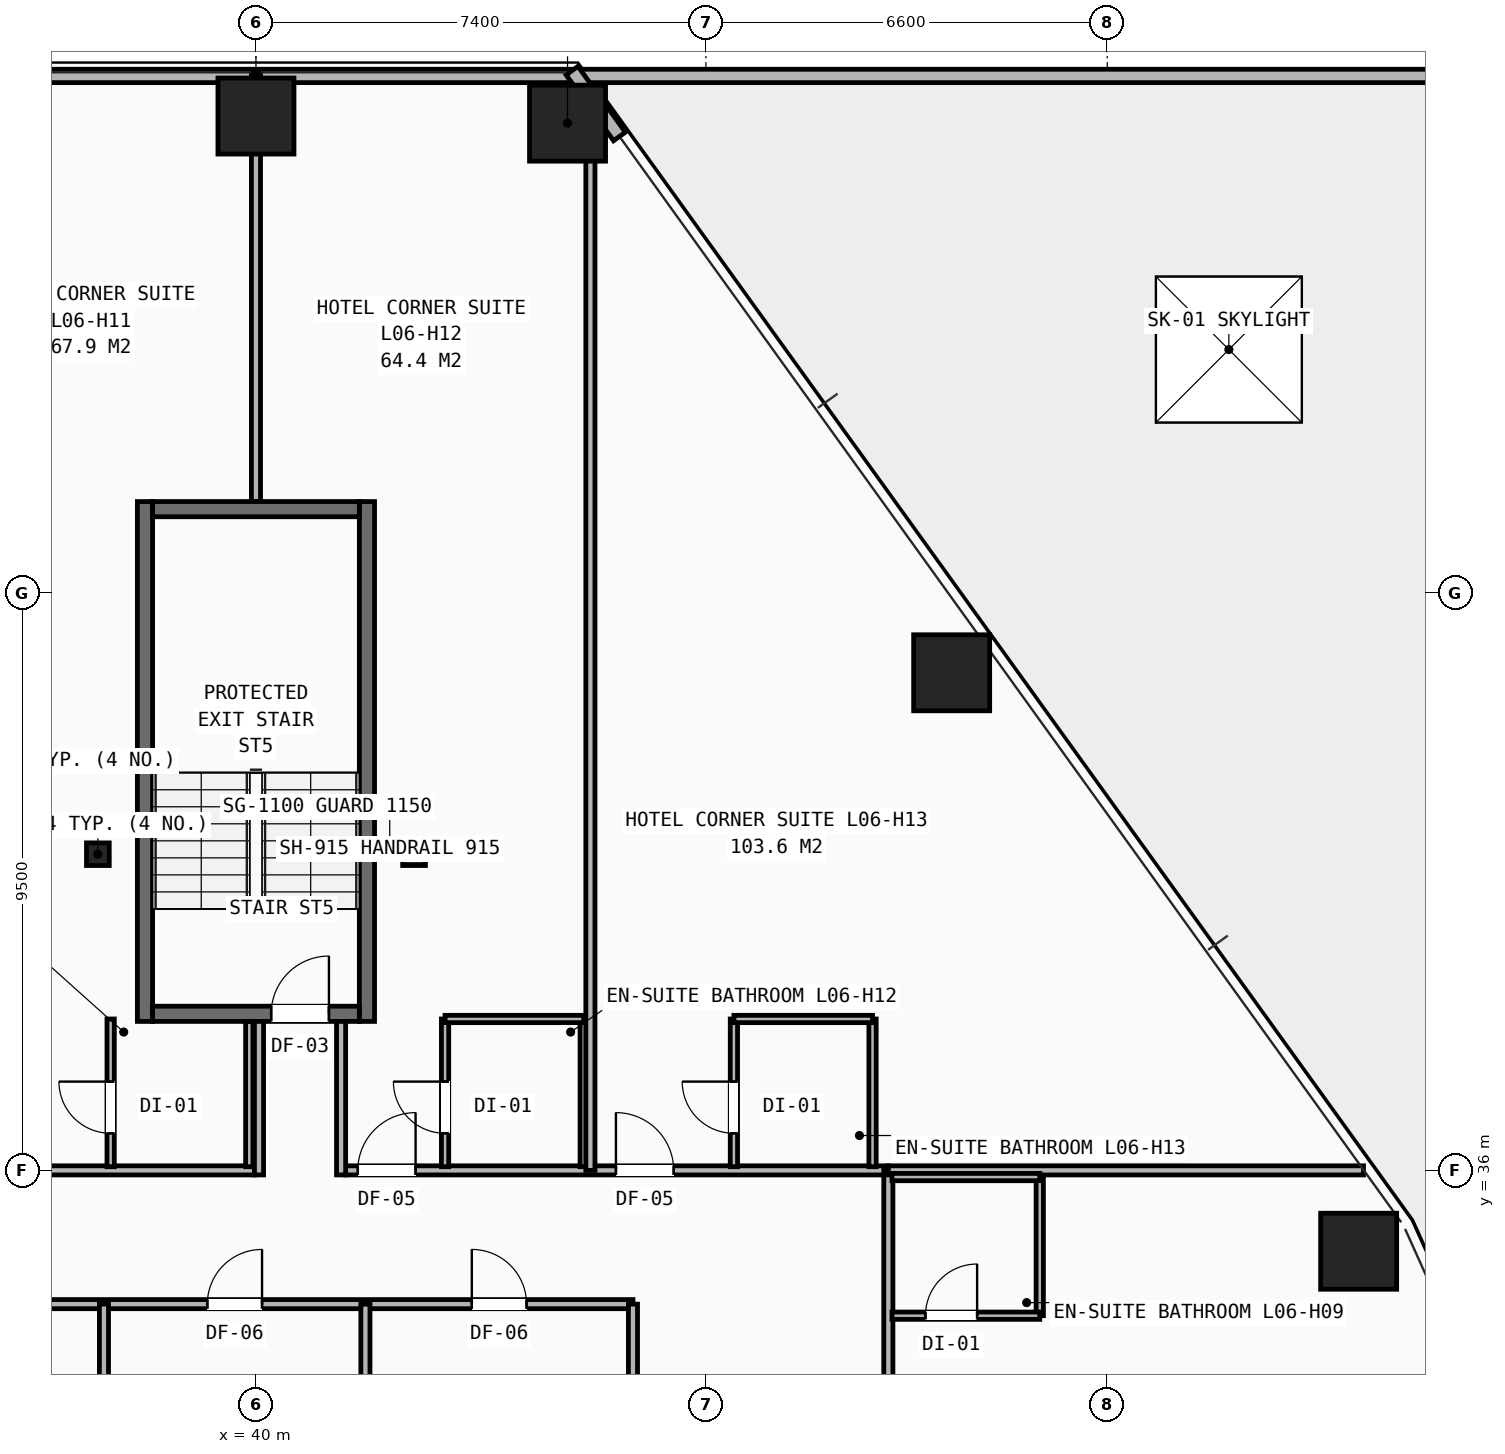
"""IFC4 building model, lengths in metres.
Left out: names, types, materials, properties, quantities, classifications, styles, units other than length and angle.
Written with IfcOpenShell. Run it as: python <this file> out.ifc"""

import sys

from ifc_helpers import new_model, si_unit, direction, frame, frame_2d, origin, origin_2d, place, context, subcontext, project, spatial, rectangle, hollow_rectangle, i_section, extrude, element, fill, save


model = new_model("IFC4")
c1 = context("Model", 3, precision=1e-05, world=origin(), true_north=direction((0.0, 1.0)))
c2 = subcontext(c1, "Body", "Model", "MODEL_VIEW")
j1 = project(units=[si_unit("LENGTHUNIT", "METRE"), si_unit("PLANEANGLEUNIT", "RADIAN")], contexts=[c1])
p1 = place(None, origin())
s1 = spatial("IfcSite", under=j1, at=p1, CompositionType="ELEMENT")
p2 = place(p1, origin())
s2 = spatial("IfcBuilding", under=s1, at=p2, CompositionType="ELEMENT")
p3 = place(p2, frame((0.0, 0.0, 27.2)))
s3 = spatial("IfcBuildingStorey", under=s2, at=p3, CompositionType="ELEMENT", Elevation=27.2)
for number, where, z_axis, x_axis in (
    (1, (37.4, 41.2, 0.0), (0.0, 0.0, 1.0), (1.0, 0.0, 0.0)),
    (2, (42.6, 41.2, 0.0), (0.0, 0.0, 1.0), (1.0, 0.0, 0.0)),
):
    element("IfcColumn", number, at=place(p3, frame(where, z_axis=z_axis, x_axis=x_axis)), inside=s3, PredefinedType="COLUMN", context=c2, shape_type="SweptSolid", body=[
        extrude(i_section(OverallWidth=0.374, OverallDepth=0.372, WebThickness=0.016, FlangeThickness=0.026, at=origin_2d()), origin(), (0.0, 0.0, 1.0), 3.2),
    ])
for number, where, z_axis, x_axis in (
    (3, (45.124, 53.223, 0.0), (0.0, 0.0, 1.0), (1.0, 0.0, 0.0)),
    (4, (40.0, 53.34, 0.0), (0.0, 0.0, 1.0), (1.0, 0.0, 0.0)),
    (5, (58.135, 34.67, 0.0), (0.0, 0.0, 1.0), (1.0, 0.0, 0.0)),
    (6, (51.441, 44.184, 0.0), (0.0, 0.0, 1.0), (1.0, 0.0, 0.0)),
):
    element("IfcColumn", number, at=place(p3, frame(where, z_axis=z_axis, x_axis=x_axis)), inside=s3, PredefinedType="COLUMN", context=c2, shape_type="SweptSolid", body=[
        extrude(hollow_rectangle(XDim=1.25, YDim=1.25, WallThickness=0.08, at=origin_2d()), origin(), (0.0, 0.0, 1.0), 3.2),
    ])
p4 = place(p3, frame((74.5, 54.0, 0.0), z_axis=(0.0, 0.0, 1.0), x_axis=(-1.0, 0.0, 0.0)))
e7 = element("IfcWall", 7, at=p4, inside=s3, PredefinedType="PARAPET", context=c2, shape_type="SweptSolid", body=[
    extrude(rectangle(XDim=69.0, YDim=0.22, at=frame_2d((34.5, 0.0))), origin(), (0.0, 0.0, 1.0), 1.15),
])
p5 = place(p3, frame((45.978, 53.005, 0.0), z_axis=(0.0, 0.0, 1.0), x_axis=(-0.584193864266, 0.811614150292, 0.0)))
e8 = element("IfcWall", 8, at=p5, inside=s3, PredefinedType="SHEAR", context=c2, shape_type="SweptSolid", body=[
    extrude(rectangle(XDim=1.334, YDim=0.24, at=frame_2d((0.667, 0.0))), origin(), (0.0, 0.0, 1.0), 2.263),
])
p6 = place(p3, frame((33.2, 33.8, 0.0), z_axis=(0.0, 0.0, 1.0), x_axis=(1.0, 0.0, 0.0)))
e9 = element("IfcWall", 9, at=p6, inside=s3, PredefinedType="PARTITIONING", context=c2, shape_type="SweptSolid", body=[
    extrude(rectangle(XDim=13.0, YDim=0.15, at=frame_2d((6.5, 0.0))), origin(), (0.0, 0.0, 1.0), 2.98),
])
p7 = place(p6, frame((1.7, 0.0, 0.0)))
e10 = element("IfcOpeningElement", 10, at=p7, cuts=e9, PredefinedType="OPENING", context=c2, shape_type="SweptSolid", body=[
    extrude(rectangle(XDim=0.9, YDim=2.1, at=frame_2d((0.45, 1.05))), frame((0.0, 0.085, 0.0), z_axis=(0.0, -1.0, 0.0), x_axis=(1.0, 0.0, 0.0)), (0.0, 0.0, 1.0), 0.17),
])
p8 = place(p6, frame((6.0, 0.0, 0.0)))
e11 = element("IfcOpeningElement", 11, at=p8, cuts=e9, PredefinedType="OPENING", context=c2, shape_type="SweptSolid", body=[
    extrude(rectangle(XDim=0.9, YDim=2.1, at=frame_2d((0.45, 1.05))), frame((0.0, 0.085, 0.0), z_axis=(0.0, -1.0, 0.0), x_axis=(1.0, 0.0, 0.0)), (0.0, 0.0, 1.0), 0.17),
])
p9 = place(p6, frame((10.35, 0.0, 0.0)))
e12 = element("IfcOpeningElement", 12, at=p9, cuts=e9, PredefinedType="OPENING", context=c2, shape_type="SweptSolid", body=[
    extrude(rectangle(XDim=0.9, YDim=2.1, at=frame_2d((0.45, 1.05))), frame((0.0, 0.085, 0.0), z_axis=(0.0, -1.0, 0.0), x_axis=(1.0, 0.0, 0.0)), (0.0, 0.0, 1.0), 0.17),
])
for number, where, z_axis, x_axis in (
    (13, (46.2, 31.2, 0.0), (0.0, 0.0, 1.0), (0.0, 1.0, 0.0)),
    (14, (37.5, 31.2, 0.0), (0.0, 0.0, 1.0), (0.0, 1.0, 0.0)),
    (15, (41.8, 31.2, 0.0), (0.0, 0.0, 1.0), (0.0, 1.0, 0.0)),
):
    element("IfcWall", number, at=place(p3, frame(where, z_axis=z_axis, x_axis=x_axis)), inside=s3, PredefinedType="PARTITIONING", context=c2, shape_type="SweptSolid", body=[
        extrude(rectangle(XDim=2.6, YDim=0.15, at=frame_2d((1.3, 0.0))), origin(), (0.0, 0.0, 1.0), 2.431),
    ])
p10 = place(p3, frame((29.6, 36.0, 0.0), z_axis=(0.0, 0.0, 1.0), x_axis=(1.0, 0.0, 0.0)))
e16 = element("IfcWall", 16, at=p10, inside=s3, PredefinedType="PARTITIONING", context=c2, shape_type="SweptSolid", body=[
    extrude(rectangle(XDim=10.375, YDim=0.15, at=frame_2d((5.188, 0.0))), origin(), (0.0, 0.0, 1.0), 2.98),
])
p11 = place(p10, frame((0.57, 0.0, 0.0)))
e17 = element("IfcOpeningElement", 17, at=p11, cuts=e16, PredefinedType="OPENING", context=c2, shape_type="SweptSolid", body=[
    extrude(rectangle(XDim=0.95, YDim=2.1, at=frame_2d((0.475, 1.05))), frame((0.0, 0.085, 0.0), z_axis=(0.0, -1.0, 0.0), x_axis=(1.0, 0.0, 0.0)), (0.0, 0.0, 1.0), 0.17),
])
p12 = place(p10, frame((5.32, 0.0, 0.0)))
e18 = element("IfcOpeningElement", 18, at=p12, cuts=e16, PredefinedType="OPENING", context=c2, shape_type="SweptSolid", body=[
    extrude(rectangle(XDim=0.95, YDim=2.1, at=frame_2d((0.475, 1.05))), frame((0.0, 0.085, 0.0), z_axis=(0.0, -1.0, 0.0), x_axis=(1.0, 0.0, 0.0)), (0.0, 0.0, 1.0), 0.17),
])
p13 = place(p3, frame((41.475, 36.0, 0.0), z_axis=(0.0, 0.0, 1.0), x_axis=(1.0, 0.0, 0.0)))
e19 = element("IfcWall", 19, at=p13, inside=s3, PredefinedType="PARTITIONING", context=c2, shape_type="SweptSolid", body=[
    extrude(rectangle(XDim=8.925, YDim=0.15, at=frame_2d((4.462, 0.0))), origin(), (0.0, 0.0, 1.0), 2.513),
])
p14 = place(p13, frame((0.2, 0.0, 0.0)))
e20 = element("IfcOpeningElement", 20, at=p14, cuts=e19, PredefinedType="OPENING", context=c2, shape_type="SweptSolid", body=[
    extrude(rectangle(XDim=0.95, YDim=2.1, at=frame_2d((0.475, 1.05))), frame((0.0, 0.085, 0.0), z_axis=(0.0, -1.0, 0.0), x_axis=(1.0, 0.0, 0.0)), (0.0, 0.0, 1.0), 0.17),
])
p15 = place(p13, frame((4.445, 0.0, 0.0)))
e21 = element("IfcOpeningElement", 21, at=p15, cuts=e19, PredefinedType="OPENING", context=c2, shape_type="SweptSolid", body=[
    extrude(rectangle(XDim=0.95, YDim=2.1, at=frame_2d((0.475, 1.05))), frame((0.0, 0.085, 0.0), z_axis=(0.0, -1.0, 0.0), x_axis=(1.0, 0.0, 0.0)), (0.0, 0.0, 1.0), 0.17),
])
p16 = place(p3, frame((50.4, 14.1, 0.0), z_axis=(0.0, 0.0, 1.0), x_axis=(0.0, 1.0, 0.0)))
e22 = element("IfcWall", 22, at=p16, inside=s3, PredefinedType="PARTITIONING", context=c2, shape_type="SweptSolid", body=[
    extrude(rectangle(XDim=21.9, YDim=0.15, at=frame_2d((10.95, 0.0))), origin(), (0.0, 0.0, 1.0), 2.431),
])
p17 = place(p16, frame((0.42, 0.0, 0.0)))
e23 = element("IfcOpeningElement", 23, at=p17, cuts=e22, PredefinedType="OPENING", context=c2, shape_type="SweptSolid", body=[
    extrude(rectangle(XDim=0.95, YDim=2.1, at=frame_2d((0.475, 1.05))), frame((0.0, 0.085, 0.0), z_axis=(0.0, -1.0, 0.0), x_axis=(1.0, 0.0, 0.0)), (0.0, 0.0, 1.0), 0.17),
])
p18 = place(p16, frame((7.82, 0.0, 0.0)))
e24 = element("IfcOpeningElement", 24, at=p18, cuts=e22, PredefinedType="OPENING", context=c2, shape_type="SweptSolid", body=[
    extrude(rectangle(XDim=0.95, YDim=2.1, at=frame_2d((0.475, 1.05))), frame((0.0, 0.085, 0.0), z_axis=(0.0, -1.0, 0.0), x_axis=(1.0, 0.0, 0.0)), (0.0, 0.0, 1.0), 0.17),
])
p19 = place(p16, frame((15.32, 0.0, 0.0)))
e25 = element("IfcOpeningElement", 25, at=p19, cuts=e22, PredefinedType="OPENING", context=c2, shape_type="SweptSolid", body=[
    extrude(rectangle(XDim=0.95, YDim=2.1, at=frame_2d((0.475, 1.05))), frame((0.0, 0.085, 0.0), z_axis=(0.0, -1.0, 0.0), x_axis=(1.0, 0.0, 0.0)), (0.0, 0.0, 1.0), 0.17),
])
p20 = place(p3, frame((50.4, 36.0, 0.0), z_axis=(0.0, 0.0, 1.0), x_axis=(1.0, 0.0, 0.0)))
e26 = element("IfcWall", 26, at=p20, inside=s3, PredefinedType="PARTITIONING", context=c2, shape_type="SweptSolid", body=[
    extrude(rectangle(XDim=7.814, YDim=0.15, at=frame_2d((3.907, 0.0))), origin(), (0.0, 0.0, 1.0), 2.268),
])
p21 = place(p3, frame((52.89, 33.61, 0.0), z_axis=(0.0, 0.0, 1.0), x_axis=(0.0, 1.0, 0.0)))
e27 = element("IfcWall", 27, at=p21, inside=s3, PredefinedType="PARTITIONING", context=c2, shape_type="SweptSolid", body=[
    extrude(rectangle(XDim=2.28, YDim=0.12, at=frame_2d((1.14, 0.0))), origin(), (0.0, 0.0, 1.0), 2.98),
])
p22 = place(p3, frame((50.46, 33.61, 0.0), z_axis=(0.0, 0.0, 1.0), x_axis=(1.0, 0.0, 0.0)))
e28 = element("IfcWall", 28, at=p22, inside=s3, PredefinedType="PARTITIONING", context=c2, shape_type="SweptSolid", body=[
    extrude(rectangle(XDim=2.43, YDim=0.12, at=frame_2d((1.215, 0.0))), origin(), (0.0, 0.0, 1.0), 2.513),
])
p23 = place(p22, frame((0.55, 0.0, 0.0)))
e29 = element("IfcOpeningElement", 29, at=p23, cuts=e28, PredefinedType="OPENING", context=c2, shape_type="SweptSolid", body=[
    extrude(rectangle(XDim=0.85, YDim=2.05, at=frame_2d((0.425, 1.025))), frame((0.0, 0.07, 0.0), z_axis=(0.0, -1.0, 0.0), x_axis=(1.0, 0.0, 0.0)), (0.0, 0.0, 1.0), 0.14),
])
p24 = place(p3, frame((50.46, 35.89, 0.0), z_axis=(0.0, 0.0, 1.0), x_axis=(1.0, 0.0, 0.0)))
e30 = element("IfcWall", 30, at=p24, inside=s3, PredefinedType="PARTITIONING", context=c2, shape_type="SweptSolid", body=[
    extrude(rectangle(XDim=2.43, YDim=0.12, at=frame_2d((1.215, 0.0))), origin(), (0.0, 0.0, 1.0), 2.513),
])
p25 = place(p3, frame((37.61, 36.06, 0.0), z_axis=(0.0, 0.0, 1.0), x_axis=(0.0, 1.0, 0.0)))
e31 = element("IfcWall", 31, at=p25, inside=s3, PredefinedType="PARTITIONING", context=c2, shape_type="SweptSolid", body=[
    extrude(rectangle(XDim=2.43, YDim=0.12, at=frame_2d((1.215, 0.0))), origin(), (0.0, 0.0, 1.0), 2.98),
])
p26 = place(p25, frame((0.55, 0.0, 0.0)))
e32 = element("IfcOpeningElement", 32, at=p26, cuts=e31, PredefinedType="OPENING", context=c2, shape_type="SweptSolid", body=[
    extrude(rectangle(XDim=0.85, YDim=2.05, at=frame_2d((0.425, 1.025))), frame((0.0, 0.07, 0.0), z_axis=(0.0, -1.0, 0.0), x_axis=(1.0, 0.0, 0.0)), (0.0, 0.0, 1.0), 0.14),
])
p27 = place(p3, frame((39.89, 36.06, 0.0), z_axis=(0.0, 0.0, 1.0), x_axis=(0.0, 1.0, 0.0)))
e33 = element("IfcWall", 33, at=p27, inside=s3, PredefinedType="PARTITIONING", context=c2, shape_type="SweptSolid", body=[
    extrude(rectangle(XDim=2.39, YDim=0.12, at=frame_2d((1.195, 0.0))), origin(), (0.0, 0.0, 1.0), 2.98),
])
p28 = place(p3, frame((40.0, 47.0, 0.0), z_axis=(0.0, 0.0, 1.0), x_axis=(0.0, 1.0, 0.0)))
e34 = element("IfcWall", 34, at=p28, inside=s3, PredefinedType="PARTITIONING", context=c2, shape_type="SweptSolid", body=[
    extrude(rectangle(XDim=7.055, YDim=0.15, at=frame_2d((3.528, 0.0))), origin(), (0.0, 0.0, 1.0), 2.268),
])
p29 = place(p3, frame((43.11, 36.06, 0.0), z_axis=(0.0, 0.0, 1.0), x_axis=(0.0, 1.0, 0.0)))
e35 = element("IfcWall", 35, at=p29, inside=s3, PredefinedType="PARTITIONING", context=c2, shape_type="SweptSolid", body=[
    extrude(rectangle(XDim=2.43, YDim=0.12, at=frame_2d((1.215, 0.0))), origin(), (0.0, 0.0, 1.0), 2.98),
])
p30 = place(p29, frame((0.55, 0.0, 0.0)))
e36 = element("IfcOpeningElement", 36, at=p30, cuts=e35, PredefinedType="OPENING", context=c2, shape_type="SweptSolid", body=[
    extrude(rectangle(XDim=0.85, YDim=2.05, at=frame_2d((0.425, 1.025))), frame((0.0, 0.07, 0.0), z_axis=(0.0, -1.0, 0.0), x_axis=(1.0, 0.0, 0.0)), (0.0, 0.0, 1.0), 0.14),
])
p31 = place(p3, frame((45.39, 36.06, 0.0), z_axis=(0.0, 0.0, 1.0), x_axis=(0.0, 1.0, 0.0)))
e37 = element("IfcWall", 37, at=p31, inside=s3, PredefinedType="PARTITIONING", context=c2, shape_type="SweptSolid", body=[
    extrude(rectangle(XDim=2.43, YDim=0.12, at=frame_2d((1.215, 0.0))), origin(), (0.0, 0.0, 1.0), 2.98),
])
p32 = place(p3, frame((43.11, 38.49, 0.0), z_axis=(0.0, 0.0, 1.0), x_axis=(1.0, 0.0, 0.0)))
e38 = element("IfcWall", 38, at=p32, inside=s3, PredefinedType="PARTITIONING", context=c2, shape_type="SweptSolid", body=[
    extrude(rectangle(XDim=2.28, YDim=0.12, at=frame_2d((1.14, 0.0))), origin(), (0.0, 0.0, 1.0), 2.98),
])
p33 = place(p3, frame((45.5, 36.0, 0.0), z_axis=(0.0, 0.0, 1.0), x_axis=(0.0, 1.0, 0.0)))
e39 = element("IfcWall", 39, at=p33, inside=s3, PredefinedType="PARTITIONING", context=c2, shape_type="SweptSolid", body=[
    extrude(rectangle(XDim=17.66, YDim=0.15, at=frame_2d((8.83, 0.0))), origin(), (0.0, 0.0, 1.0), 2.268),
])
p34 = place(p3, frame((47.86, 36.06, 0.0), z_axis=(0.0, 0.0, 1.0), x_axis=(0.0, 1.0, 0.0)))
e40 = element("IfcWall", 40, at=p34, inside=s3, PredefinedType="PARTITIONING", context=c2, shape_type="SweptSolid", body=[
    extrude(rectangle(XDim=2.43, YDim=0.12, at=frame_2d((1.215, 0.0))), origin(), (0.0, 0.0, 1.0), 2.98),
])
p35 = place(p34, frame((0.55, 0.0, 0.0)))
e41 = element("IfcOpeningElement", 41, at=p35, cuts=e40, PredefinedType="OPENING", context=c2, shape_type="SweptSolid", body=[
    extrude(rectangle(XDim=0.85, YDim=2.05, at=frame_2d((0.425, 1.025))), frame((0.0, 0.07, 0.0), z_axis=(0.0, -1.0, 0.0), x_axis=(1.0, 0.0, 0.0)), (0.0, 0.0, 1.0), 0.14),
])
p36 = place(p3, frame((50.14, 36.06, 0.0), z_axis=(0.0, 0.0, 1.0), x_axis=(0.0, 1.0, 0.0)))
e42 = element("IfcWall", 42, at=p36, inside=s3, PredefinedType="PARTITIONING", context=c2, shape_type="SweptSolid", body=[
    extrude(rectangle(XDim=2.43, YDim=0.12, at=frame_2d((1.215, 0.0))), origin(), (0.0, 0.0, 1.0), 2.513),
])
p37 = place(p3, frame((47.86, 38.49, 0.0), z_axis=(0.0, 0.0, 1.0), x_axis=(1.0, 0.0, 0.0)))
e43 = element("IfcWall", 43, at=p37, inside=s3, PredefinedType="PARTITIONING", context=c2, shape_type="SweptSolid", body=[
    extrude(rectangle(XDim=2.28, YDim=0.12, at=frame_2d((1.14, 0.0))), origin(), (0.0, 0.0, 1.0), 2.513),
])
for number, where, z_axis, x_axis in (
    (44, (38.175, 38.45, 0.0), (0.0, 0.0, 1.0), (0.0, 1.0, 0.0)),
    (45, (41.825, 38.45, 0.0), (0.0, 0.0, 1.0), (0.0, 1.0, 0.0)),
):
    element("IfcWall", number, at=place(p3, frame(where, z_axis=z_axis, x_axis=x_axis)), inside=s3, PredefinedType="SHEAR", context=c2, shape_type="SweptSolid", body=[
        extrude(rectangle(XDim=8.55, YDim=0.25, at=frame_2d((4.275, 0.0))), origin(), (0.0, 0.0, 1.0), 2.98),
    ])
p38 = place(p3, frame((38.3, 38.575, 0.0), z_axis=(0.0, 0.0, 1.0), x_axis=(1.0, 0.0, 0.0)))
e46 = element("IfcWall", 46, at=p38, inside=s3, PredefinedType="SHEAR", context=c2, shape_type="SweptSolid", body=[
    extrude(rectangle(XDim=3.4, YDim=0.25, at=frame_2d((1.7, 0.0))), origin(), (0.0, 0.0, 1.0), 2.98),
])
p39 = place(p38, frame((1.95, 0.0, 0.0)))
e47 = element("IfcOpeningElement", 47, at=p39, cuts=e46, PredefinedType="OPENING", context=c2, shape_type="SweptSolid", body=[
    extrude(rectangle(XDim=0.95, YDim=2.1, at=frame_2d((0.475, 1.05))), frame((0.0, 0.135, 0.0), z_axis=(0.0, -1.0, 0.0), x_axis=(1.0, 0.0, 0.0)), (0.0, 0.0, 1.0), 0.27),
])
p40 = place(p3, frame((38.3, 46.875, 0.0), z_axis=(0.0, 0.0, 1.0), x_axis=(1.0, 0.0, 0.0)))
e48 = element("IfcWall", 48, at=p40, inside=s3, PredefinedType="SHEAR", context=c2, shape_type="SweptSolid", body=[
    extrude(rectangle(XDim=3.4, YDim=0.25, at=frame_2d((1.7, 0.0))), origin(), (0.0, 0.0, 1.0), 2.98),
])
for number, where, z_axis, x_axis in (
    (49, (40.05, 35.925, 0.0), (0.0, 0.0, 1.0), (0.0, 1.0, 0.0)),
    (50, (41.4, 35.925, 0.0), (0.0, 0.0, 1.0), (0.0, 1.0, 0.0)),
):
    element("IfcWall", number, at=place(p3, frame(where, z_axis=z_axis, x_axis=x_axis)), inside=s3, PredefinedType="PARTITIONING", context=c2, shape_type="SweptSolid", body=[
        extrude(rectangle(XDim=2.525, YDim=0.15, at=frame_2d((1.262, 0.0))), origin(), (0.0, 0.0, 1.0), 2.98),
    ])
p41 = place(p3, frame((0.0, 0.0, -0.3)))
p42 = place(p41, frame((56.0, 49.5, 0.0)))
p43 = place(p42, frame((0.0, 0.0, 0.25)))
e51 = element("IfcWindow", 51, at=p43, inside=s3, PartitioningType="SINGLE_PANEL", PredefinedType="SKYLIGHT", context=c2, shape_type="SweptSolid", body=[
    extrude(rectangle(XDim=2.4, YDim=2.4, at=origin_2d()), origin(), (0.0, 0.0, 1.0), 0.05),
])
p44 = place(p8, origin())
e52 = element("IfcDoor", 52, at=p44, inside=s3, OperationType="SINGLE_SWING_RIGHT", PredefinedType="DOOR", context=c2, shape_type="SweptSolid", body=[
    extrude(rectangle(XDim=0.9, YDim=2.1, at=frame_2d((0.45, 1.05))), frame((0.0, 0.025, 0.0), z_axis=(0.0, -1.0, 0.0), x_axis=(1.0, 0.0, 0.0)), (0.0, 0.0, 1.0), 0.05),
])
fill(e11, e52)
p45 = place(p9, origin())
e53 = element("IfcDoor", 53, at=p45, inside=s3, OperationType="SINGLE_SWING_LEFT", PredefinedType="DOOR", context=c2, shape_type="SweptSolid", body=[
    extrude(rectangle(XDim=0.9, YDim=2.1, at=frame_2d((0.45, 1.05))), frame((0.0, 0.025, 0.0), z_axis=(0.0, -1.0, 0.0), x_axis=(1.0, 0.0, 0.0)), (0.0, 0.0, 1.0), 0.05),
])
fill(e12, e53)
p46 = place(p23, origin())
e54 = element("IfcDoor", 54, at=p46, inside=s3, OperationType="SINGLE_SWING_RIGHT", PredefinedType="DOOR", context=c2, shape_type="SweptSolid", body=[
    extrude(rectangle(XDim=0.85, YDim=2.05, at=frame_2d((0.425, 1.025))), frame((0.0, 0.025, 0.0), z_axis=(0.0, -1.0, 0.0), x_axis=(1.0, 0.0, 0.0)), (0.0, 0.0, 1.0), 0.05),
])
fill(e29, e54)
p47 = place(p26, origin())
e55 = element("IfcDoor", 55, at=p47, inside=s3, OperationType="SINGLE_SWING_RIGHT", PredefinedType="DOOR", context=c2, shape_type="SweptSolid", body=[
    extrude(rectangle(XDim=0.85, YDim=2.05, at=frame_2d((0.425, 1.025))), frame((0.0, 0.025, 0.0), z_axis=(0.0, -1.0, 0.0), x_axis=(1.0, 0.0, 0.0)), (0.0, 0.0, 1.0), 0.05),
])
fill(e32, e55)
p48 = place(p14, origin())
e56 = element("IfcDoor", 56, at=p48, inside=s3, OperationType="SINGLE_SWING_RIGHT", PredefinedType="DOOR", context=c2, shape_type="SweptSolid", body=[
    extrude(rectangle(XDim=0.95, YDim=2.1, at=frame_2d((0.475, 1.05))), frame((0.0, 0.025, 0.0), z_axis=(0.0, -1.0, 0.0), x_axis=(1.0, 0.0, 0.0)), (0.0, 0.0, 1.0), 0.05),
])
fill(e20, e56)
p49 = place(p30, origin())
e57 = element("IfcDoor", 57, at=p49, inside=s3, OperationType="SINGLE_SWING_RIGHT", PredefinedType="DOOR", context=c2, shape_type="SweptSolid", body=[
    extrude(rectangle(XDim=0.85, YDim=2.05, at=frame_2d((0.425, 1.025))), frame((0.0, 0.025, 0.0), z_axis=(0.0, -1.0, 0.0), x_axis=(1.0, 0.0, 0.0)), (0.0, 0.0, 1.0), 0.05),
])
fill(e36, e57)
p50 = place(p15, origin())
e58 = element("IfcDoor", 58, at=p50, inside=s3, OperationType="SINGLE_SWING_LEFT", PredefinedType="DOOR", context=c2, shape_type="SweptSolid", body=[
    extrude(rectangle(XDim=0.95, YDim=2.1, at=frame_2d((0.475, 1.05))), frame((0.0, 0.025, 0.0), z_axis=(0.0, -1.0, 0.0), x_axis=(1.0, 0.0, 0.0)), (0.0, 0.0, 1.0), 0.05),
])
fill(e21, e58)
p51 = place(p35, origin())
e59 = element("IfcDoor", 59, at=p51, inside=s3, OperationType="SINGLE_SWING_RIGHT", PredefinedType="DOOR", context=c2, shape_type="SweptSolid", body=[
    extrude(rectangle(XDim=0.85, YDim=2.05, at=frame_2d((0.425, 1.025))), frame((0.0, 0.025, 0.0), z_axis=(0.0, -1.0, 0.0), x_axis=(1.0, 0.0, 0.0)), (0.0, 0.0, 1.0), 0.05),
])
fill(e41, e59)
p52 = place(p39, origin())
e60 = element("IfcDoor", 60, at=p52, inside=s3, OperationType="SINGLE_SWING_RIGHT", PredefinedType="DOOR", context=c2, shape_type="SweptSolid", body=[
    extrude(rectangle(XDim=0.95, YDim=2.1, at=frame_2d((0.475, 1.05))), frame((0.0, 0.025, 0.0), z_axis=(0.0, -1.0, 0.0), x_axis=(1.0, 0.0, 0.0)), (0.0, 0.0, 1.0), 0.05),
])
fill(e47, e60)
save(model, sys.argv[1])
